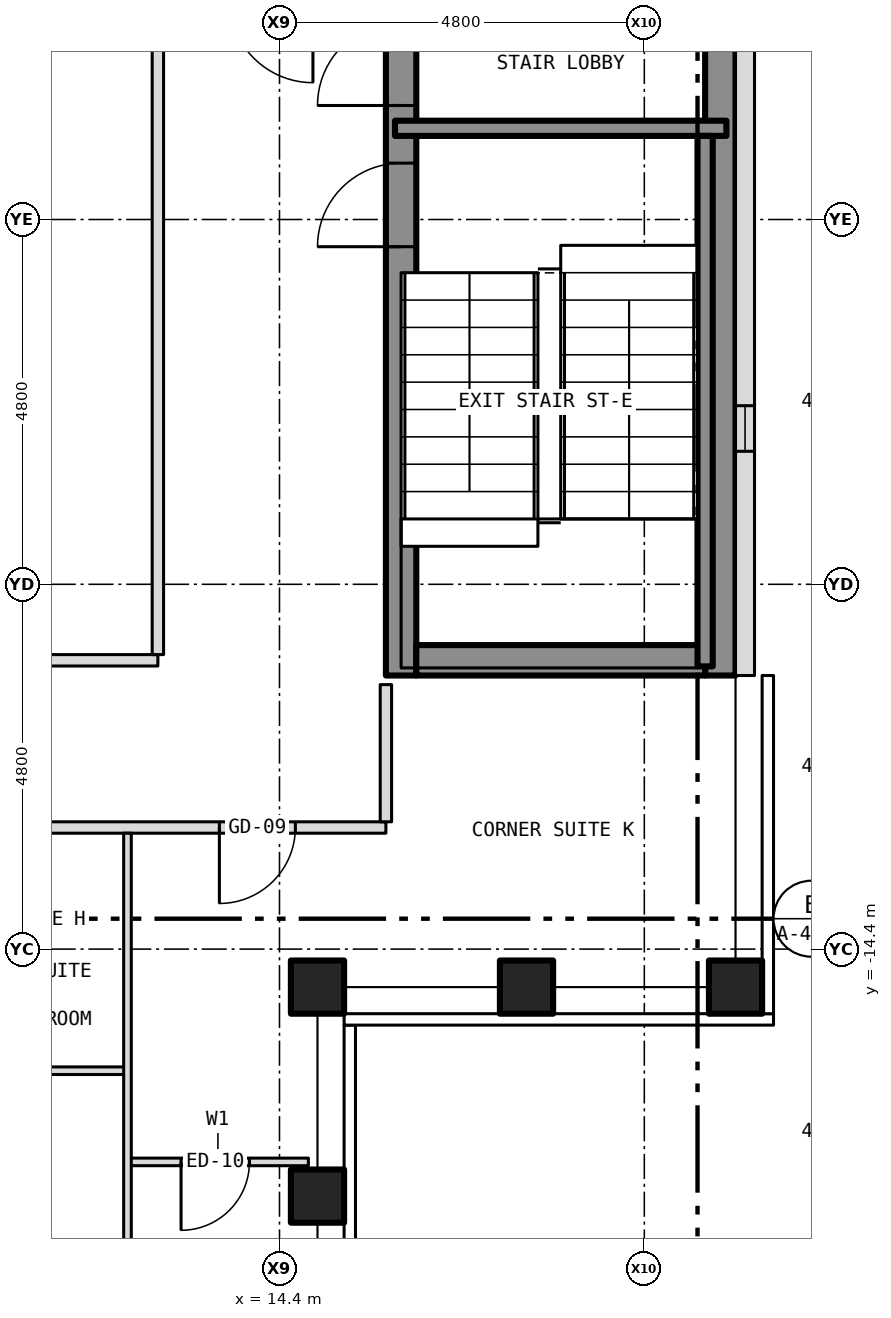
"""IFC4 building model, lengths in metres.
Left out: names, types, materials, properties, quantities, classifications, styles, units other than length and angle.
Written with IfcOpenShell. Run it as: python <this file> out.ifc"""

import sys

from ifc_helpers import new_model, si_unit, direction, frame, frame_2d, origin, origin_2d, place, context, subcontext, project, spatial, rectangle, hollow_rectangle, extrude, element, fill, save


model = new_model("IFC4")
c1 = context("Model", 3, precision=1e-05, world=origin(), true_north=direction((0.0, 1.0)))
c2 = subcontext(c1, "Body", "Model", "MODEL_VIEW")
j1 = project(units=[si_unit("LENGTHUNIT", "METRE"), si_unit("PLANEANGLEUNIT", "RADIAN")], contexts=[c1])
p1 = place(None, origin())
s1 = spatial("IfcSite", under=j1, at=p1, CompositionType="ELEMENT")
p2 = place(p1, origin())
s2 = spatial("IfcBuilding", under=s1, at=p2, CompositionType="ELEMENT")
p3 = place(p2, frame((0.0, 0.0, 208.5)))
s3 = spatial("IfcBuildingStorey", under=s2, at=p3, CompositionType="ELEMENT", Elevation=208.5)
for number, where, z_axis, x_axis in (
    (1, (20.4, -14.9, -0.15), (0.0, 0.0, 1.0), (1.0, 0.0, 0.0)),
    (2, (14.9, -14.9, -0.15), (0.0, 0.0, 1.0), (1.0, 0.0, 0.0)),
    (3, (14.9, -17.65, -0.15), (0.0, 0.0, 1.0), (1.0, 0.0, 0.0)),
    (4, (17.65, -14.9, -0.15), (0.0, 0.0, 1.0), (1.0, 0.0, 0.0)),
):
    element("IfcColumn", number, at=place(p3, frame(where, z_axis=z_axis, x_axis=x_axis)), inside=s3, PredefinedType="COLUMN", context=c2, shape_type="SweptSolid", body=[
        extrude(hollow_rectangle(XDim=0.7, YDim=0.7, WallThickness=0.04, at=origin_2d()), origin(), (0.0, 0.0, 1.0), 3.5),
    ])
p4 = place(p3, frame((16.0, -10.8, 0.0), z_axis=(0.0, 0.0, 1.0), x_axis=(0.0, 1.0, 0.0)))
e5 = element("IfcWall", 5, at=p4, inside=s3, PredefinedType="SHEAR", context=c2, shape_type="SweptSolid", body=[
    extrude(rectangle(XDim=21.6, YDim=0.4, at=frame_2d((10.8, 0.0))), origin(), (0.0, 0.0, 1.0), 3.25),
])
p5 = place(p4, frame((9.4, 0.0, 0.0)))
e6 = element("IfcOpeningElement", 6, at=p5, cuts=e5, PredefinedType="OPENING", context=c2, shape_type="SweptSolid", body=[
    extrude(rectangle(XDim=1.1, YDim=2.1, at=frame_2d((0.55, 1.05))), frame((0.0, 0.212, 0.0), z_axis=(0.0, -1.0, 0.0), x_axis=(1.0, 0.0, 0.0)), (0.0, 0.0, 1.0), 0.424),
])
p6 = place(p4, frame((11.5, 0.0, 0.0)))
e7 = element("IfcOpeningElement", 7, at=p6, cuts=e5, PredefinedType="OPENING", context=c2, shape_type="SweptSolid", body=[
    extrude(rectangle(XDim=1.1, YDim=2.1, at=frame_2d((0.55, 1.05))), frame((0.0, 0.212, 0.0), z_axis=(0.0, -1.0, 0.0), x_axis=(1.0, 0.0, 0.0)), (0.0, 0.0, 1.0), 0.424),
])
p7 = place(p4, frame((13.6, 0.0, 0.0)))
e8 = element("IfcOpeningElement", 8, at=p7, cuts=e5, PredefinedType="OPENING", context=c2, shape_type="SweptSolid", body=[
    extrude(rectangle(XDim=1.1, YDim=2.1, at=frame_2d((0.55, 1.05))), frame((0.0, 0.212, 0.0), z_axis=(0.0, -1.0, 0.0), x_axis=(1.0, 0.0, 0.0)), (0.0, 0.0, 1.0), 0.424),
])
p8 = place(p4, frame((15.7, 0.0, 0.0)))
e9 = element("IfcOpeningElement", 9, at=p8, cuts=e5, PredefinedType="OPENING", context=c2, shape_type="SweptSolid", body=[
    extrude(rectangle(XDim=1.1, YDim=2.1, at=frame_2d((0.55, 1.05))), frame((0.0, 0.212, 0.0), z_axis=(0.0, -1.0, 0.0), x_axis=(1.0, 0.0, 0.0)), (0.0, 0.0, 1.0), 0.424),
])
p9 = place(p4, frame((17.8, 0.0, 0.0)))
e10 = element("IfcOpeningElement", 10, at=p9, cuts=e5, PredefinedType="OPENING", context=c2, shape_type="SweptSolid", body=[
    extrude(rectangle(XDim=1.1, YDim=2.1, at=frame_2d((0.55, 1.05))), frame((0.0, 0.212, 0.0), z_axis=(0.0, -1.0, 0.0), x_axis=(1.0, 0.0, 0.0)), (0.0, 0.0, 1.0), 0.424),
])
p10 = place(p4, frame((5.642, 0.0, 0.0)))
e11 = element("IfcOpeningElement", 11, at=p10, cuts=e5, PredefinedType="OPENING", context=c2, shape_type="SweptSolid", body=[
    extrude(rectangle(XDim=1.1, YDim=2.1, at=frame_2d((0.55, 1.05))), frame((0.0, 0.212, 0.0), z_axis=(0.0, -1.0, 0.0), x_axis=(1.0, 0.0, 0.0)), (0.0, 0.0, 1.0), 0.424),
])
p11 = place(p4, frame((7.5, 0.0, 0.0)))
e12 = element("IfcOpeningElement", 12, at=p11, cuts=e5, PredefinedType="OPENING", context=c2, shape_type="SweptSolid", body=[
    extrude(rectangle(XDim=1.1, YDim=2.1, at=frame_2d((0.55, 1.05))), frame((0.0, 0.212, 0.0), z_axis=(0.0, -1.0, 0.0), x_axis=(1.0, 0.0, 0.0)), (0.0, 0.0, 1.0), 0.424),
])
p12 = place(p4, frame((20.0, 0.0, 0.0)))
e13 = element("IfcOpeningElement", 13, at=p12, cuts=e5, PredefinedType="OPENING", context=c2, shape_type="SweptSolid", body=[
    extrude(rectangle(XDim=0.9, YDim=2.1, at=frame_2d((0.45, 1.05))), frame((0.0, 0.212, 0.0), z_axis=(0.0, -1.0, 0.0), x_axis=(1.0, 0.0, 0.0)), (0.0, 0.0, 1.0), 0.424),
])
p13 = place(p3, frame((20.2, -10.8, 0.0), z_axis=(0.0, 0.0, 1.0), x_axis=(0.0, 1.0, 0.0)))
e14 = element("IfcWall", 14, at=p13, inside=s3, PredefinedType="SHEAR", context=c2, shape_type="SweptSolid", body=[
    extrude(rectangle(XDim=21.6, YDim=0.4, at=frame_2d((10.8, 0.0))), origin(), (0.0, 0.0, 1.0), 3.25),
])
p14 = place(p3, frame((16.2, -10.6, 0.0), z_axis=(0.0, 0.0, 1.0), x_axis=(1.0, 0.0, 0.0)))
e15 = element("IfcWall", 15, at=p14, inside=s3, PredefinedType="SHEAR", context=c2, shape_type="SweptSolid", body=[
    extrude(rectangle(XDim=3.8, YDim=0.4, at=frame_2d((1.9, 0.0))), origin(), (0.0, 0.0, 1.0), 3.25),
])
p15 = place(p3, frame((20.525, -10.8, 0.0), z_axis=(0.0, 0.0, 1.0), x_axis=(0.0, 1.0, 0.0)))
e16 = element("IfcWall", 16, at=p15, inside=s3, PredefinedType="SOLIDWALL", context=c2, shape_type="SweptSolid", body=[
    extrude(rectangle(XDim=21.6, YDim=0.25, at=frame_2d((10.8, 0.0))), origin(), (0.0, 0.0, 1.0), 3.5),
])
p16 = place(p15, frame((2.95, 0.0, 1.0)))
e17 = element("IfcOpeningElement", 17, at=p16, cuts=e16, PredefinedType="OPENING", context=c2, shape_type="SweptSolid", body=[
    extrude(rectangle(XDim=0.6, YDim=1.5, at=frame_2d((0.3, 0.75))), frame((0.0, 0.137, 0.0), z_axis=(0.0, -1.0, 0.0), x_axis=(1.0, 0.0, 0.0)), (0.0, 0.0, 1.0), 0.274),
])
p17 = place(p3, frame((12.4, -17.2, 0.0), z_axis=(0.0, 0.0, 1.0), x_axis=(1.0, 0.0, 0.0)))
e18 = element("IfcWall", 18, at=p17, inside=s3, PredefinedType="PARTITIONING", context=c2, shape_type="SweptSolid", body=[
    extrude(rectangle(XDim=2.38, YDim=0.1, at=frame_2d((1.19, 0.0))), origin(), (0.0, 0.0, 1.0), 3.35),
])
p18 = place(p17, frame((0.705, 0.0, 0.0)))
e19 = element("IfcOpeningElement", 19, at=p18, cuts=e18, PredefinedType="OPENING", context=c2, shape_type="SweptSolid", body=[
    extrude(rectangle(XDim=0.9, YDim=2.1, at=frame_2d((0.45, 1.05))), frame((0.0, 0.062, 0.0), z_axis=(0.0, -1.0, 0.0), x_axis=(1.0, 0.0, 0.0)), (0.0, 0.0, 1.0), 0.124),
])
p19 = place(p3, frame((10.2, -16.0, 0.0), z_axis=(0.0, 0.0, 1.0), x_axis=(1.0, 0.0, 0.0)))
e20 = element("IfcWall", 20, at=p19, inside=s3, PredefinedType="PARTITIONING", context=c2, shape_type="SweptSolid", body=[
    extrude(rectangle(XDim=2.2, YDim=0.1, at=frame_2d((1.1, 0.0))), origin(), (0.0, 0.0, 1.0), 3.35),
])
p20 = place(p3, frame((-15.8, -12.8, 0.0), z_axis=(0.0, 0.0, 1.0), x_axis=(1.0, 0.0, 0.0)))
e21 = element("IfcWall", 21, at=p20, inside=s3, PredefinedType="PARTITIONING", context=c2, shape_type="SweptSolid", body=[
    extrude(rectangle(XDim=31.6, YDim=0.15, at=frame_2d((15.8, 0.0))), origin(), (0.0, 0.0, 1.0), 3.35),
])
p21 = place(p20, frame((6.466, 0.0, 0.0)))
e22 = element("IfcOpeningElement", 22, at=p21, cuts=e21, PredefinedType="OPENING", context=c2, shape_type="SweptSolid", body=[
    extrude(rectangle(XDim=1.0, YDim=2.1, at=frame_2d((0.5, 1.05))), frame((0.0, 0.087, 0.0), z_axis=(0.0, -1.0, 0.0), x_axis=(1.0, 0.0, 0.0)), (0.0, 0.0, 1.0), 0.174),
])
p22 = place(p20, frame((15.548, 0.0, 0.0)))
e23 = element("IfcOpeningElement", 23, at=p22, cuts=e21, PredefinedType="OPENING", context=c2, shape_type="SweptSolid", body=[
    extrude(rectangle(XDim=1.0, YDim=2.1, at=frame_2d((0.5, 1.05))), frame((0.0, 0.087, 0.0), z_axis=(0.0, -1.0, 0.0), x_axis=(1.0, 0.0, 0.0)), (0.0, 0.0, 1.0), 0.174),
])
p23 = place(p20, frame((20.018, 0.0, 0.0)))
e24 = element("IfcOpeningElement", 24, at=p23, cuts=e21, PredefinedType="OPENING", context=c2, shape_type="SweptSolid", body=[
    extrude(rectangle(XDim=1.0, YDim=2.1, at=frame_2d((0.5, 1.05))), frame((0.0, 0.087, 0.0), z_axis=(0.0, -1.0, 0.0), x_axis=(1.0, 0.0, 0.0)), (0.0, 0.0, 1.0), 0.174),
])
p24 = place(p20, frame((1.192, 0.0, 0.0)))
e25 = element("IfcOpeningElement", 25, at=p24, cuts=e21, PredefinedType="OPENING", context=c2, shape_type="SweptSolid", body=[
    extrude(rectangle(XDim=1.0, YDim=2.1, at=frame_2d((0.5, 1.05))), frame((0.0, 0.087, 0.0), z_axis=(0.0, -1.0, 0.0), x_axis=(1.0, 0.0, 0.0)), (0.0, 0.0, 1.0), 0.174),
])
p25 = place(p20, frame((29.409, 0.0, 0.0)))
e26 = element("IfcOpeningElement", 26, at=p25, cuts=e21, PredefinedType="OPENING", context=c2, shape_type="SweptSolid", body=[
    extrude(rectangle(XDim=1.0, YDim=2.1, at=frame_2d((0.5, 1.05))), frame((0.0, 0.087, 0.0), z_axis=(0.0, -1.0, 0.0), x_axis=(1.0, 0.0, 0.0)), (0.0, 0.0, 1.0), 0.174),
])
p26 = place(p3, frame((3.3, -10.6, 0.0), z_axis=(0.0, 0.0, 1.0), x_axis=(1.0, 0.0, 0.0)))
e27 = element("IfcWall", 27, at=p26, inside=s3, PredefinedType="PARTITIONING", context=c2, shape_type="SweptSolid", body=[
    extrude(rectangle(XDim=9.5, YDim=0.15, at=frame_2d((4.75, 0.0))), origin(), (0.0, 0.0, 1.0), 3.35),
])
p27 = place(p3, frame((15.92, -3.6, 0.0), z_axis=(0.0, 0.0, 1.0), x_axis=(1.0, 0.0, 0.0)))
e28 = element("IfcWall", 28, at=p27, inside=s3, PredefinedType="SHEAR", context=c2, shape_type="SweptSolid", body=[
    extrude(rectangle(XDim=4.36, YDim=0.2, at=frame_2d((2.18, 0.0))), origin(), (0.0, 0.0, 1.0), 3.25),
])
p28 = place(p3, frame((12.4, -20.78, 0.0), z_axis=(0.0, 0.0, 1.0), x_axis=(0.0, 1.0, 0.0)))
e29 = element("IfcWall", 29, at=p28, inside=s3, PredefinedType="PARTITIONING", context=c2, shape_type="SweptSolid", body=[
    extrude(rectangle(XDim=7.905, YDim=0.1, at=frame_2d((3.953, 0.0))), origin(), (0.0, 0.0, 1.0), 3.35),
])
p29 = place(p3, frame((12.8, -10.525, 0.0), z_axis=(0.0, 0.0, 1.0), x_axis=(0.0, 1.0, 0.0)))
e30 = element("IfcWall", 30, at=p29, inside=s3, PredefinedType="PARTITIONING", context=c2, shape_type="SweptSolid", body=[
    extrude(rectangle(XDim=8.525, YDim=0.15, at=frame_2d((4.262, 0.0))), origin(), (0.0, 0.0, 1.0), 3.35),
])
p30 = place(p3, frame((15.8, -12.725, 0.0), z_axis=(0.0, 0.0, 1.0), x_axis=(0.0, 1.0, 0.0)))
e31 = element("IfcWall", 31, at=p30, inside=s3, PredefinedType="PARTITIONING", context=c2, shape_type="SweptSolid", body=[
    extrude(rectangle(XDim=1.805, YDim=0.15, at=frame_2d((0.903, 0.0))), origin(), (0.0, 0.0, 1.0), 3.35),
])
p31 = place(p3, frame((20.0, -10.68, 0.0), z_axis=(0.0, 0.0, 1.0), x_axis=(0.0, 1.0, 0.0)))
e32 = element("IfcWall", 32, at=p31, inside=s3, PredefinedType="SHEAR", context=c2, shape_type="SweptSolid", body=[
    extrude(rectangle(XDim=6.98, YDim=0.2, at=frame_2d((3.49, 0.0))), origin(), (0.0, 0.0, 1.0), 3.25),
])
p32 = place(p16, origin())
e33 = element("IfcWindow", 33, at=p32, inside=s3, PartitioningType="SINGLE_PANEL", PredefinedType="WINDOW", context=c2, shape_type="SweptSolid", body=[
    extrude(rectangle(XDim=0.6, YDim=1.5, at=frame_2d((0.3, 0.75))), frame((0.0, -0.035, 0.0), z_axis=(0.0, -1.0, 0.0), x_axis=(1.0, 0.0, 0.0)), (0.0, 0.0, 1.0), 0.06),
])
fill(e17, e33)
p33 = place(p10, origin())
e34 = element("IfcDoor", 34, at=p33, inside=s3, OperationType="SINGLE_SWING_LEFT", PredefinedType="DOOR", context=c2, shape_type="SweptSolid", body=[
    extrude(rectangle(XDim=1.1, YDim=2.1, at=frame_2d((0.55, 1.05))), frame((0.0, 0.025, 0.0), z_axis=(0.0, -1.0, 0.0), x_axis=(1.0, 0.0, 0.0)), (0.0, 0.0, 1.0), 0.05),
])
fill(e11, e34)
p34 = place(p11, origin())
e35 = element("IfcDoor", 35, at=p34, inside=s3, OperationType="SINGLE_SWING_LEFT", PredefinedType="DOOR", context=c2, shape_type="SweptSolid", body=[
    extrude(rectangle(XDim=1.1, YDim=2.1, at=frame_2d((0.55, 1.05))), frame((0.0, 0.025, 0.0), z_axis=(0.0, -1.0, 0.0), x_axis=(1.0, 0.0, 0.0)), (0.0, 0.0, 1.0), 0.05),
])
fill(e12, e35)
p35 = place(p18, origin())
e36 = element("IfcDoor", 36, at=p35, inside=s3, OperationType="SINGLE_SWING_LEFT", PredefinedType="DOOR", context=c2, shape_type="SweptSolid", body=[
    extrude(rectangle(XDim=0.9, YDim=2.1, at=frame_2d((0.45, 1.05))), frame((0.0, 0.025, 0.0), z_axis=(0.0, -1.0, 0.0), x_axis=(1.0, 0.0, 0.0)), (0.0, 0.0, 1.0), 0.05),
])
fill(e19, e36)
p36 = place(p25, origin())
e37 = element("IfcDoor", 37, at=p36, inside=s3, OperationType="SINGLE_SWING_LEFT", PredefinedType="DOOR", context=c2, shape_type="SweptSolid", body=[
    extrude(rectangle(XDim=1.0, YDim=2.1, at=frame_2d((0.5, 1.05))), frame((0.0, 0.025, 0.0), z_axis=(0.0, -1.0, 0.0), x_axis=(1.0, 0.0, 0.0)), (0.0, 0.0, 1.0), 0.05),
])
fill(e26, e37)
save(model, sys.argv[1])
